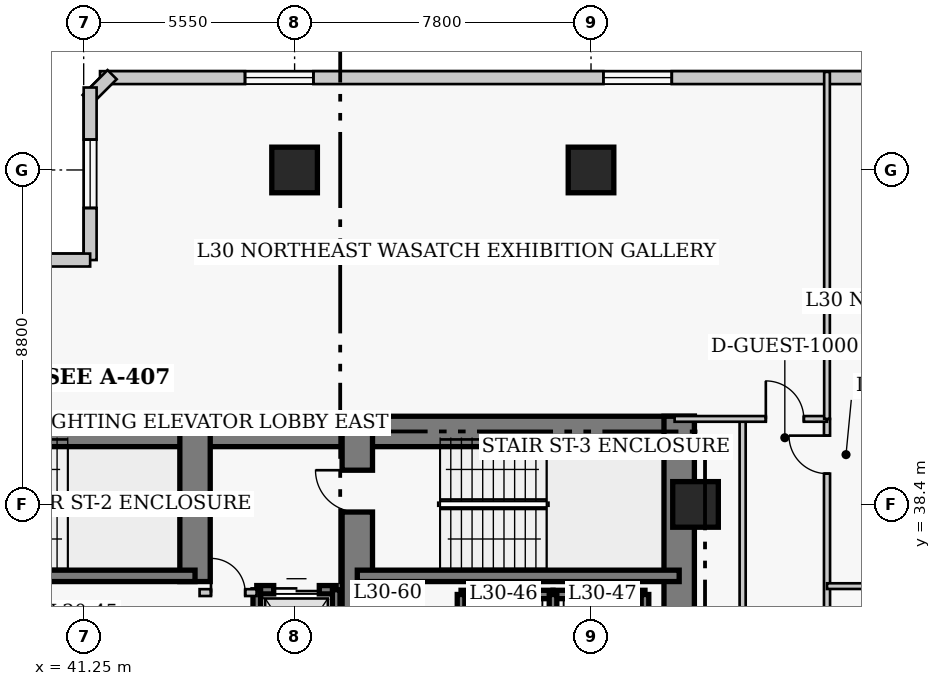
"""IFC4 building model, lengths in metres.
Left out: names, types, materials, properties, quantities, classifications, styles, units other than length and angle.
Written with IfcOpenShell. Run it as: python <this file> out.ifc"""

import sys

from ifc_helpers import new_model, si_unit, direction, frame, frame_2d, origin, origin_2d, place, context, subcontext, project, spatial, rectangle, extrude, element, fill, save


model = new_model("IFC4")
c1 = context("Model", 3, precision=1e-05, world=origin(), true_north=direction((0.0, 1.0)))
c2 = subcontext(c1, "Body", "Model", "MODEL_VIEW")
j1 = project(units=[si_unit("LENGTHUNIT", "METRE"), si_unit("PLANEANGLEUNIT", "RADIAN")], contexts=[c1])
p1 = place(None, origin())
s1 = spatial("IfcSite", under=j1, at=p1, CompositionType="ELEMENT")
p2 = place(p1, origin())
s2 = spatial("IfcBuilding", under=s1, at=p2, CompositionType="ELEMENT")
p3 = place(p2, frame((0.0, 0.0, 122.2)))
s3 = spatial("IfcBuildingStorey", under=s2, at=p3, CompositionType="ELEMENT", Elevation=122.2)
p4 = place(p3, frame((35.85, 40.32, 0.0), z_axis=(0.0, 0.0, 1.0), x_axis=(1.0, 0.0, 0.0)))
e1 = element("IfcWall", 1, at=p4, inside=s3, PredefinedType="SHEAR", context=c2, shape_type="SweptSolid", body=[
    extrude(rectangle(XDim=12.6, YDim=0.8, at=frame_2d((6.3, 0.0))), origin(), (0.0, 0.0, 1.0), 3.8),
])
p5 = place(p3, frame((48.45, 40.32, 0.0), z_axis=(0.0, 0.0, 1.0), x_axis=(1.0, 0.0, 0.0)))
e2 = element("IfcWall", 2, at=p5, inside=s3, PredefinedType="SHEAR", context=c2, shape_type="SweptSolid", body=[
    extrude(rectangle(XDim=8.87, YDim=0.8, at=frame_2d((4.435, 0.0))), origin(), (0.0, 0.0, 1.0), 3.8),
])
p6 = place(p3, frame((56.92, 27.05, 0.0), z_axis=(0.0, 0.0, 1.0), x_axis=(0.0, 1.0, 0.0)))
e3 = element("IfcWall", 3, at=p6, inside=s3, PredefinedType="SHEAR", context=c2, shape_type="SweptSolid", body=[
    extrude(rectangle(XDim=13.67, YDim=0.8, at=frame_2d((6.835, 0.0))), origin(), (0.0, 0.0, 1.0), 3.8),
])
p7 = place(p3, frame((44.18, 36.37, 0.0), z_axis=(0.0, 0.0, 1.0), x_axis=(0.0, 1.0, 0.0)))
e4 = element("IfcWall", 4, at=p7, inside=s3, PredefinedType="SHEAR", context=c2, shape_type="SweptSolid", body=[
    extrude(rectangle(XDim=3.95, YDim=0.8, at=frame_2d((1.975, 0.0))), origin(), (0.0, 0.0, 1.0), 3.8),
])
p8 = place(p3, frame((48.45, 32.35, 0.0), z_axis=(0.0, 0.0, 1.0), x_axis=(0.0, 1.0, 0.0)))
e5 = element("IfcWall", 5, at=p8, inside=s3, PredefinedType="SHEAR", context=c2, shape_type="SweptSolid", body=[
    extrude(rectangle(XDim=7.97, YDim=0.8, at=frame_2d((3.985, 0.0))), origin(), (0.0, 0.0, 1.0), 3.8),
])
p9 = place(p8, frame((5.85, 0.0, 0.0)))
e6 = element("IfcOpeningElement", 6, at=p9, cuts=e5, PredefinedType="OPENING", context=c2, shape_type="SweptSolid", body=[
    extrude(rectangle(XDim=1.1, YDim=2.15, at=frame_2d((0.55, 1.075))), frame((0.0, 0.41, 0.0), z_axis=(0.0, -1.0, 0.0), x_axis=(1.0, 0.0, 0.0)), (0.0, 0.0, 1.0), 0.82),
])
p10 = place(p3, frame((35.85, 36.52, 0.0), z_axis=(0.0, 0.0, 1.0), x_axis=(1.0, 0.0, 0.0)))
e7 = element("IfcWall", 7, at=p10, inside=s3, PredefinedType="SHEAR", context=c2, shape_type="SweptSolid", body=[
    extrude(rectangle(XDim=8.33, YDim=0.3, at=frame_2d((4.165, 0.0))), origin(), (0.0, 0.0, 1.0), 3.8),
])
p11 = place(p3, frame((48.45, 36.52, 0.0), z_axis=(0.0, 0.0, 1.0), x_axis=(1.0, 0.0, 0.0)))
e8 = element("IfcWall", 8, at=p11, inside=s3, PredefinedType="SHEAR", context=c2, shape_type="SweptSolid", body=[
    extrude(rectangle(XDim=8.47, YDim=0.3, at=frame_2d((4.235, 0.0))), origin(), (0.0, 0.0, 1.0), 3.8),
])
for number, where, z_axis, x_axis in (
    (9, (46.8, 47.2, 0.0), (0.0, 0.0, 1.0), (1.0, 0.0, 0.0)),
    (10, (54.6, 47.2, 0.0), (0.0, 0.0, 1.0), (1.0, 0.0, 0.0)),
    (11, (57.35, 38.4, 0.0), (0.0, 0.0, 1.0), (1.0, 0.0, 0.0)),
):
    element("IfcColumn", number, at=place(p3, frame(where, z_axis=z_axis, x_axis=x_axis)), inside=s3, PredefinedType="COLUMN", context=c2, shape_type="SweptSolid", body=[
        extrude(rectangle(XDim=1.2, YDim=1.2, at=origin_2d()), origin(), (0.0, 0.0, 1.0), 3.8),
    ])
p12 = place(p3, frame((69.97, 49.63, 0.0), z_axis=(0.0, 0.0, 1.0), x_axis=(-1.0, 0.0, 0.0)))
e12 = element("IfcWall", 12, at=p12, inside=s3, PredefinedType="SOLIDWALL", context=c2, shape_type="SweptSolid", body=[
    extrude(rectangle(XDim=28.29, YDim=0.34, at=frame_2d((14.145, 0.0))), origin(), (0.0, 0.0, 1.0), 3.54),
])
p13 = place(p12, frame((3.815, 0.0, 0.85)))
e13 = element("IfcOpeningElement", 13, at=p13, cuts=e12, PredefinedType="OPENING", context=c2, shape_type="SweptSolid", body=[
    extrude(rectangle(XDim=1.8, YDim=1.8, at=frame_2d((0.9, 0.9))), frame((0.0, 0.18, 0.0), z_axis=(0.0, -1.0, 0.0), x_axis=(1.0, 0.0, 0.0)), (0.0, 0.0, 1.0), 0.36),
])
p14 = place(p12, frame((13.245, 0.0, 0.85)))
e14 = element("IfcOpeningElement", 14, at=p14, cuts=e12, PredefinedType="OPENING", context=c2, shape_type="SweptSolid", body=[
    extrude(rectangle(XDim=1.8, YDim=1.8, at=frame_2d((0.9, 0.9))), frame((0.0, 0.18, 0.0), z_axis=(0.0, -1.0, 0.0), x_axis=(1.0, 0.0, 0.0)), (0.0, 0.0, 1.0), 0.36),
])
p15 = place(p12, frame((22.675, 0.0, 0.85)))
e15 = element("IfcOpeningElement", 15, at=p15, cuts=e12, PredefinedType="OPENING", context=c2, shape_type="SweptSolid", body=[
    extrude(rectangle(XDim=1.8, YDim=1.8, at=frame_2d((0.9, 0.9))), frame((0.0, 0.18, 0.0), z_axis=(0.0, -1.0, 0.0), x_axis=(1.0, 0.0, 0.0)), (0.0, 0.0, 1.0), 0.36),
])
p16 = place(p3, frame((41.999, 49.708, 0.0), z_axis=(0.0, 0.0, 1.0), x_axis=(-0.707238225886, -0.706975312048, 0.0)))
e16 = element("IfcWall", 16, at=p16, inside=s3, PredefinedType="SOLIDWALL", context=c2, shape_type="SweptSolid", body=[
    extrude(rectangle(XDim=0.929, YDim=0.34, at=frame_2d((0.464, 0.0))), origin(), (0.0, 0.0, 1.0), 3.54),
])
p17 = place(p3, frame((41.42, 49.37, 0.0), z_axis=(0.0, 0.0, 1.0), x_axis=(0.0, -1.0, 0.0)))
e17 = element("IfcWall", 17, at=p17, inside=s3, PredefinedType="SOLIDWALL", context=c2, shape_type="SweptSolid", body=[
    extrude(rectangle(XDim=4.54, YDim=0.34, at=frame_2d((2.27, 0.0))), origin(), (0.0, 0.0, 1.0), 3.54),
])
p18 = place(p17, frame((1.37, 0.0, 0.85)))
e18 = element("IfcOpeningElement", 18, at=p18, cuts=e17, PredefinedType="OPENING", context=c2, shape_type="SweptSolid", body=[
    extrude(rectangle(XDim=1.8, YDim=1.8, at=frame_2d((0.9, 0.9))), frame((0.0, 0.18, 0.0), z_axis=(0.0, -1.0, 0.0), x_axis=(1.0, 0.0, 0.0)), (0.0, 0.0, 1.0), 0.36),
])
p19 = place(p3, frame((41.42, 44.83, 0.0), z_axis=(0.0, 0.0, 1.0), x_axis=(-1.0, 0.0, 0.0)))
e19 = element("IfcWall", 19, at=p19, inside=s3, PredefinedType="SOLIDWALL", context=c2, shape_type="SweptSolid", body=[
    extrude(rectangle(XDim=4.84, YDim=0.34, at=frame_2d((2.42, 0.0))), origin(), (0.0, 0.0, 1.0), 3.54),
])
p20 = place(p19, frame((1.52, 0.0, 0.85)))
e20 = element("IfcOpeningElement", 20, at=p20, cuts=e19, PredefinedType="OPENING", context=c2, shape_type="SweptSolid", body=[
    extrude(rectangle(XDim=1.8, YDim=1.8, at=frame_2d((0.9, 0.9))), frame((0.0, 0.18, 0.0), z_axis=(0.0, -1.0, 0.0), x_axis=(1.0, 0.0, 0.0)), (0.0, 0.0, 1.0), 0.36),
])
p21 = place(p3, frame((51.18, 36.03, 0.0), z_axis=(0.0, 0.0, 1.0), x_axis=(1.0, 0.0, 0.0)))
e21 = element("IfcWall", 21, at=p21, inside=s3, PredefinedType="SHEAR", context=c2, shape_type="SweptSolid", body=[
    extrude(rectangle(XDim=2.42, YDim=0.22, at=frame_2d((1.21, 0.0))), origin(), (0.0, 0.0, 1.0), 3.8),
])
p22 = place(p3, frame((51.18, 33.17, 0.0), z_axis=(0.0, 0.0, 1.0), x_axis=(0.0, 1.0, 0.0)))
e22 = element("IfcWall", 22, at=p22, inside=s3, PredefinedType="SHEAR", context=c2, shape_type="SweptSolid", body=[
    extrude(rectangle(XDim=2.86, YDim=0.2, at=frame_2d((1.43, 0.0))), origin(), (0.0, 0.0, 1.0), 3.8),
])
p23 = place(p3, frame((53.6, 36.03, 0.0), z_axis=(0.0, 0.0, 1.0), x_axis=(1.0, 0.0, 0.0)))
e23 = element("IfcWall", 23, at=p23, inside=s3, PredefinedType="SHEAR", context=c2, shape_type="SweptSolid", body=[
    extrude(rectangle(XDim=2.42, YDim=0.22, at=frame_2d((1.21, 0.0))), origin(), (0.0, 0.0, 1.0), 3.8),
])
for number, where, z_axis, x_axis in (
    (24, (53.6, 33.17, 0.0), (0.0, 0.0, 1.0), (0.0, 1.0, 0.0)),
    (25, (56.02, 33.17, 0.0), (0.0, 0.0, 1.0), (0.0, 1.0, 0.0)),
):
    element("IfcWall", number, at=place(p3, frame(where, z_axis=z_axis, x_axis=x_axis)), inside=s3, PredefinedType="SHEAR", context=c2, shape_type="SweptSolid", body=[
        extrude(rectangle(XDim=2.86, YDim=0.2, at=frame_2d((1.43, 0.0))), origin(), (0.0, 0.0, 1.0), 3.8),
    ])
p24 = place(p3, frame((45.805, 36.155, 0.0), z_axis=(0.0, 0.0, 1.0), x_axis=(1.0, 0.0, 0.0)))
e26 = element("IfcWall", 26, at=p24, inside=s3, PredefinedType="SHEAR", context=c2, shape_type="SweptSolid", body=[
    extrude(rectangle(XDim=2.09, YDim=0.22, at=frame_2d((1.045, 0.0))), origin(), (0.0, 0.0, 1.0), 3.8),
])
p25 = place(p24, frame((0.445, 0.0, 0.0)))
e27 = element("IfcOpeningElement", 27, at=p25, cuts=e26, PredefinedType="OPENING", context=c2, shape_type="SweptSolid", body=[
    extrude(rectangle(XDim=1.2, YDim=2.15, at=frame_2d((0.6, 1.075))), frame((0.0, 0.12, 0.0), z_axis=(0.0, -1.0, 0.0), x_axis=(1.0, 0.0, 0.0)), (0.0, 0.0, 1.0), 0.24),
])
p26 = place(p3, frame((45.805, 32.65, 0.0), z_axis=(0.0, 0.0, 1.0), x_axis=(0.0, 1.0, 0.0)))
e28 = element("IfcWall", 28, at=p26, inside=s3, PredefinedType="SHEAR", context=c2, shape_type="SweptSolid", body=[
    extrude(rectangle(XDim=3.505, YDim=0.2, at=frame_2d((1.752, 0.0))), origin(), (0.0, 0.0, 1.0), 3.8),
])
p27 = place(p3, frame((47.895, 33.245, 0.0), z_axis=(0.0, 0.0, 1.0), x_axis=(0.0, 1.0, 0.0)))
e29 = element("IfcWall", 29, at=p27, inside=s3, PredefinedType="SHEAR", context=c2, shape_type="SweptSolid", body=[
    extrude(rectangle(XDim=2.91, YDim=0.2, at=frame_2d((1.455, 0.0))), origin(), (0.0, 0.0, 1.0), 3.8),
])
p28 = place(p3, frame((44.3, 36.08, 0.0), z_axis=(0.0, 0.0, 1.0), x_axis=(1.0, 0.0, 0.0)))
e30 = element("IfcWall", 30, at=p28, inside=s3, PredefinedType="PARTITIONING", context=c2, shape_type="SweptSolid", body=[
    extrude(rectangle(XDim=1.5, YDim=0.18, at=frame_2d((0.75, 0.0))), origin(), (0.0, 0.0, 1.0), 3.54),
])
p29 = place(p28, frame((0.3, 0.0, 0.0)))
e31 = element("IfcOpeningElement", 31, at=p29, cuts=e30, PredefinedType="OPENING", context=c2, shape_type="SweptSolid", body=[
    extrude(rectangle(XDim=0.9, YDim=2.15, at=frame_2d((0.45, 1.075))), frame((0.0, 0.1, 0.0), z_axis=(0.0, -1.0, 0.0), x_axis=(1.0, 0.0, 0.0)), (0.0, 0.0, 1.0), 0.2),
])
for number, where, z_axis, x_axis in (
    (32, (48.92, 32.75, 0.0), (0.0, 0.0, 1.0), (0.0, 1.0, 0.0)),
    (33, (50.01, 32.75, 0.0), (0.0, 0.0, 1.0), (0.0, 1.0, 0.0)),
):
    element("IfcWall", number, at=place(p3, frame(where, z_axis=z_axis, x_axis=x_axis)), inside=s3, PredefinedType="PARTITIONING", context=c2, shape_type="SweptSolid", body=[
        extrude(rectangle(XDim=3.62, YDim=0.15, at=frame_2d((1.81, 0.0))), origin(), (0.0, 0.0, 1.0), 3.54),
    ])
p30 = place(p3, frame((60.81, 11.85, 0.0), z_axis=(0.0, 0.0, 1.0), x_axis=(0.0, 1.0, 0.0)))
e34 = element("IfcWall", 34, at=p30, inside=s3, PredefinedType="PARTITIONING", context=c2, shape_type="SweptSolid", body=[
    extrude(rectangle(XDim=28.8, YDim=0.16, at=frame_2d((14.4, 0.0))), origin(), (0.0, 0.0, 1.0), 3.54),
])
p31 = place(p30, frame((3.6, 0.0, 0.0)))
e35 = element("IfcOpeningElement", 35, at=p31, cuts=e34, PredefinedType="OPENING", context=c2, shape_type="SweptSolid", body=[
    extrude(rectangle(XDim=0.95, YDim=2.1, at=frame_2d((0.475, 1.05))), frame((0.0, 0.09, 0.0), z_axis=(0.0, -1.0, 0.0), x_axis=(1.0, 0.0, 0.0)), (0.0, 0.0, 1.0), 0.18),
])
p32 = place(p30, frame((12.075, 0.0, 0.0)))
e36 = element("IfcOpeningElement", 36, at=p32, cuts=e34, PredefinedType="OPENING", context=c2, shape_type="SweptSolid", body=[
    extrude(rectangle(XDim=0.95, YDim=2.1, at=frame_2d((0.475, 1.05))), frame((0.0, 0.09, 0.0), z_axis=(0.0, -1.0, 0.0), x_axis=(1.0, 0.0, 0.0)), (0.0, 0.0, 1.0), 0.18),
])
p33 = place(p30, frame((20.2, 0.0, 0.0)))
e37 = element("IfcOpeningElement", 37, at=p33, cuts=e34, PredefinedType="OPENING", context=c2, shape_type="SweptSolid", body=[
    extrude(rectangle(XDim=0.95, YDim=2.1, at=frame_2d((0.475, 1.05))), frame((0.0, 0.09, 0.0), z_axis=(0.0, -1.0, 0.0), x_axis=(1.0, 0.0, 0.0)), (0.0, 0.0, 1.0), 0.18),
])
p34 = place(p30, frame((27.36, 0.0, 0.0)))
e38 = element("IfcOpeningElement", 38, at=p34, cuts=e34, PredefinedType="OPENING", context=c2, shape_type="SweptSolid", body=[
    extrude(rectangle(XDim=1.0, YDim=2.15, at=frame_2d((0.5, 1.075))), frame((0.0, 0.09, 0.0), z_axis=(0.0, -1.0, 0.0), x_axis=(1.0, 0.0, 0.0)), (0.0, 0.0, 1.0), 0.18),
])
p35 = place(p3, frame((58.59, 25.11, 0.0), z_axis=(0.0, 0.0, 1.0), x_axis=(0.0, 1.0, 0.0)))
e39 = element("IfcWall", 39, at=p35, inside=s3, PredefinedType="PARTITIONING", context=c2, shape_type="SweptSolid", body=[
    extrude(rectangle(XDim=15.54, YDim=0.16, at=frame_2d((7.77, 0.0))), origin(), (0.0, 0.0, 1.0), 3.54),
])
p36 = place(p3, frame((56.8, 40.65, 0.0), z_axis=(0.0, 0.0, 1.0), x_axis=(1.0, 0.0, 0.0)))
e40 = element("IfcWall", 40, at=p36, inside=s3, PredefinedType="PARTITIONING", context=c2, shape_type="SweptSolid", body=[
    extrude(rectangle(XDim=4.01, YDim=0.15, at=frame_2d((2.005, 0.0))), origin(), (0.0, 0.0, 1.0), 3.54),
])
p37 = place(p36, frame((2.4, 0.0, 0.0)))
e41 = element("IfcOpeningElement", 41, at=p37, cuts=e40, PredefinedType="OPENING", context=c2, shape_type="SweptSolid", body=[
    extrude(rectangle(XDim=1.0, YDim=2.15, at=frame_2d((0.5, 1.075))), frame((0.0, 0.085, 0.0), z_axis=(0.0, -1.0, 0.0), x_axis=(1.0, 0.0, 0.0)), (0.0, 0.0, 1.0), 0.17),
])
p38 = place(p3, frame((60.81, 40.65, 0.0), z_axis=(0.0, 0.0, 1.0), x_axis=(0.0, 1.0, 0.0)))
e42 = element("IfcWall", 42, at=p38, inside=s3, PredefinedType="PARTITIONING", context=c2, shape_type="SweptSolid", body=[
    extrude(rectangle(XDim=9.13, YDim=0.15, at=frame_2d((4.565, 0.0))), origin(), (0.0, 0.0, 1.0), 3.54),
])
p39 = place(p3, frame((60.81, 36.25, 0.0), z_axis=(0.0, 0.0, 1.0), x_axis=(1.0, 0.0, 0.0)))
e43 = element("IfcWall", 43, at=p39, inside=s3, PredefinedType="PARTITIONING", context=c2, shape_type="SweptSolid", body=[
    extrude(rectangle(XDim=4.29, YDim=0.15, at=frame_2d((2.145, 0.0))), origin(), (0.0, 0.0, 1.0), 3.54),
])
p40 = place(p14, origin())
e44 = element("IfcWindow", 44, at=p40, inside=s3, PartitioningType="SINGLE_PANEL", PredefinedType="WINDOW", context=c2, shape_type="SweptSolid", body=[
    extrude(rectangle(XDim=1.8, YDim=1.8, at=frame_2d((0.9, 0.9))), frame((0.0, 0.03, 0.0), z_axis=(0.0, -1.0, 0.0), x_axis=(1.0, 0.0, 0.0)), (0.0, 0.0, 1.0), 0.06),
])
fill(e14, e44)
p41 = place(p15, origin())
e45 = element("IfcWindow", 45, at=p41, inside=s3, PartitioningType="SINGLE_PANEL", PredefinedType="WINDOW", context=c2, shape_type="SweptSolid", body=[
    extrude(rectangle(XDim=1.8, YDim=1.8, at=frame_2d((0.9, 0.9))), frame((0.0, 0.03, 0.0), z_axis=(0.0, -1.0, 0.0), x_axis=(1.0, 0.0, 0.0)), (0.0, 0.0, 1.0), 0.06),
])
fill(e15, e45)
p42 = place(p18, origin())
e46 = element("IfcWindow", 46, at=p42, inside=s3, PartitioningType="SINGLE_PANEL", PredefinedType="WINDOW", context=c2, shape_type="SweptSolid", body=[
    extrude(rectangle(XDim=1.8, YDim=1.8, at=frame_2d((0.9, 0.9))), frame((0.0, 0.03, 0.0), z_axis=(0.0, -1.0, 0.0), x_axis=(1.0, 0.0, 0.0)), (0.0, 0.0, 1.0), 0.06),
])
fill(e18, e46)
p43 = place(p25, origin())
e47 = element("IfcDoor", 47, at=p43, inside=s3, OperationType="DOUBLE_DOOR_SLIDING", PredefinedType="DOOR", context=c2, shape_type="SweptSolid", body=[
    extrude(rectangle(XDim=1.2, YDim=2.15, at=frame_2d((0.6, 1.075))), frame((0.0, 0.025, 0.0), z_axis=(0.0, -1.0, 0.0), x_axis=(1.0, 0.0, 0.0)), (0.0, 0.0, 1.0), 0.05),
])
fill(e27, e47)
p44 = place(p29, origin())
e48 = element("IfcDoor", 48, at=p44, inside=s3, OperationType="SINGLE_SWING_LEFT", PredefinedType="DOOR", context=c2, shape_type="SweptSolid", body=[
    extrude(rectangle(XDim=0.9, YDim=2.15, at=frame_2d((0.45, 1.075))), frame((0.0, 0.025, 0.0), z_axis=(0.0, -1.0, 0.0), x_axis=(1.0, 0.0, 0.0)), (0.0, 0.0, 1.0), 0.05),
])
fill(e31, e48)
p45 = place(p37, origin())
e49 = element("IfcDoor", 49, at=p45, inside=s3, OperationType="SINGLE_SWING_LEFT", PredefinedType="DOOR", context=c2, shape_type="SweptSolid", body=[
    extrude(rectangle(XDim=1.0, YDim=2.15, at=frame_2d((0.5, 1.075))), frame((0.0, 0.025, 0.0), z_axis=(0.0, -1.0, 0.0), x_axis=(1.0, 0.0, 0.0)), (0.0, 0.0, 1.0), 0.05),
])
fill(e41, e49)
p46 = place(p34, origin())
e50 = element("IfcDoor", 50, at=p46, inside=s3, OperationType="SINGLE_SWING_RIGHT", PredefinedType="DOOR", context=c2, shape_type="SweptSolid", body=[
    extrude(rectangle(XDim=1.0, YDim=2.15, at=frame_2d((0.5, 1.075))), frame((0.0, 0.025, 0.0), z_axis=(0.0, -1.0, 0.0), x_axis=(1.0, 0.0, 0.0)), (0.0, 0.0, 1.0), 0.05),
])
fill(e38, e50)
p47 = place(p9, origin())
e51 = element("IfcDoor", 51, at=p47, inside=s3, OperationType="SINGLE_SWING_RIGHT", PredefinedType="DOOR", context=c2, shape_type="SweptSolid", body=[
    extrude(rectangle(XDim=1.1, YDim=2.15, at=frame_2d((0.55, 1.075))), frame((0.0, 0.025, 0.0), z_axis=(0.0, -1.0, 0.0), x_axis=(1.0, 0.0, 0.0)), (0.0, 0.0, 1.0), 0.05),
])
fill(e6, e51)
save(model, sys.argv[1])
